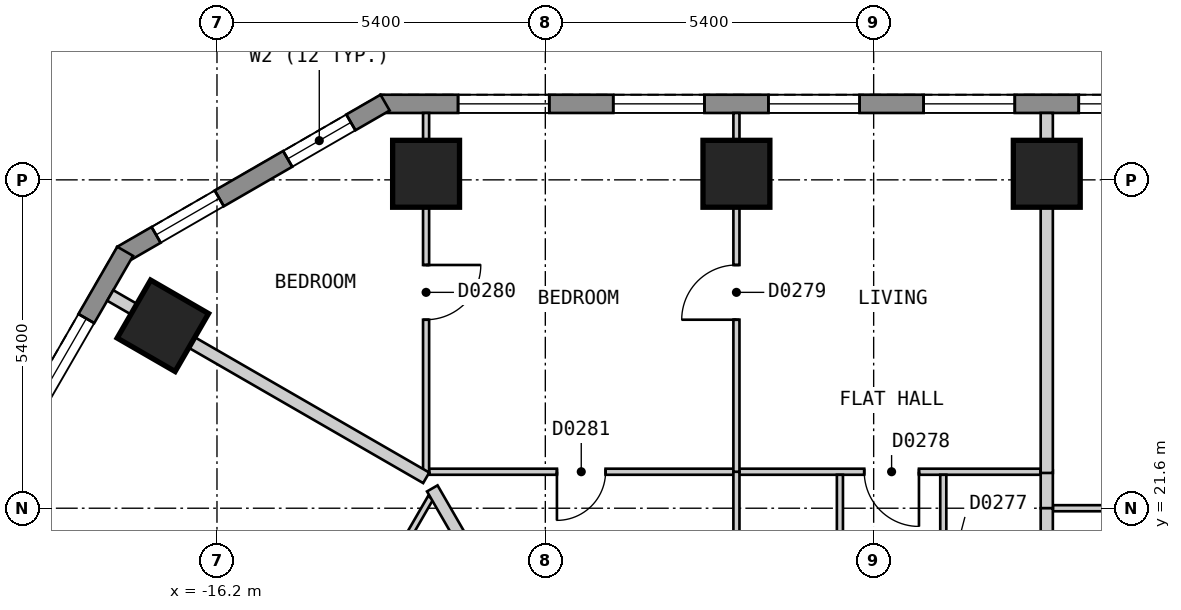
"""IFC4 building model, lengths in metres.
Left out: names, types, materials, properties, quantities, classifications, styles, units other than length and angle.
Written with IfcOpenShell. Run it as: python <this file> out.ifc"""

import sys

from ifc_helpers import new_model, si_unit, direction, frame, frame_2d, origin, origin_2d, place, context, subcontext, project, spatial, polyline, rectangle, outline, extrude, element, fill, save


model = new_model("IFC4")
c1 = context("Model", 3, precision=1e-05, world=origin(), true_north=direction((0.0, 1.0)))
c2 = subcontext(c1, "Body", "Model", "MODEL_VIEW")
j1 = project(units=[si_unit("LENGTHUNIT", "METRE"), si_unit("PLANEANGLEUNIT", "RADIAN")], contexts=[c1])
p1 = place(None, origin())
s1 = spatial("IfcSite", under=j1, at=p1, CompositionType="ELEMENT")
p2 = place(p1, origin())
s2 = spatial("IfcBuilding", under=s1, at=p2, CompositionType="ELEMENT")
p3 = place(p2, frame((0.0, 0.0, 47.4)))
s3 = spatial("IfcBuildingStorey", under=s2, at=p3, CompositionType="ELEMENT", Elevation=47.4)
for number, where, z_axis, x_axis in (
    (1, (-2.553, 27.1, 0.0), (0.0, 0.0, 1.0), (-1.0, 0.0, 0.0)),
    (2, (-7.657, 27.1, 0.0), (0.0, 0.0, 1.0), (-1.0, 0.0, 0.0)),
    (3, (-12.761, 27.1, 0.0), (0.0, 0.0, 1.0), (-1.0, 0.0, 0.0)),
    (4, (-17.09, 24.6, 0.0), (0.0, 0.0, 1.0), (-0.5, -0.866, 0.0)),
):
    element("IfcColumn", number, at=place(p3, frame(where, z_axis=z_axis, x_axis=x_axis)), inside=s3, PredefinedType="COLUMN", context=c2, shape_type="SweptSolid", body=[
        extrude(rectangle(XDim=1.1, YDim=1.1, at=origin_2d()), origin(), (0.0, 0.0, 1.0), 3.0),
    ])
p4 = place(p3, frame((13.51, 28.25, 0.0), z_axis=(0.0, 0.0, 1.0), x_axis=(-1.0, 0.0, 0.0)))
e5 = element("IfcWall", 5, at=p4, inside=s3, PredefinedType="SOLIDWALL", context=c2, shape_type="SweptSolid", body=[
    extrude(outline(polyline([(0.0, -0.15), (27.02, -0.15), (26.94, 0.15), (0.08, 0.15), (0.0, -0.15)])), origin(), (0.0, 0.0, 1.0), 2.7),
])
p5 = place(p4, frame((1.277, 0.0, 0.15)))
e6 = element("IfcOpeningElement", 6, at=p5, cuts=e5, PredefinedType="OPENING", context=c2, shape_type="SweptSolid", body=[
    extrude(rectangle(XDim=1.5, YDim=2.1, at=frame_2d((0.75, 1.05))), frame((0.0, 0.16, 0.0), z_axis=(0.0, -1.0, 0.0), x_axis=(1.0, 0.0, 0.0)), (0.0, 0.0, 1.0), 0.32),
])
p6 = place(p4, frame((3.829, 0.0, 0.15)))
e7 = element("IfcOpeningElement", 7, at=p6, cuts=e5, PredefinedType="OPENING", context=c2, shape_type="SweptSolid", body=[
    extrude(rectangle(XDim=1.5, YDim=2.1, at=frame_2d((0.75, 1.05))), frame((0.0, 0.16, 0.0), z_axis=(0.0, -1.0, 0.0), x_axis=(1.0, 0.0, 0.0)), (0.0, 0.0, 1.0), 0.32),
])
p7 = place(p4, frame((6.381, 0.0, 0.15)))
e8 = element("IfcOpeningElement", 8, at=p7, cuts=e5, PredefinedType="OPENING", context=c2, shape_type="SweptSolid", body=[
    extrude(rectangle(XDim=1.5, YDim=2.1, at=frame_2d((0.75, 1.05))), frame((0.0, 0.16, 0.0), z_axis=(0.0, -1.0, 0.0), x_axis=(1.0, 0.0, 0.0)), (0.0, 0.0, 1.0), 0.32),
])
p8 = place(p4, frame((8.933, 0.0, 0.15)))
e9 = element("IfcOpeningElement", 9, at=p8, cuts=e5, PredefinedType="OPENING", context=c2, shape_type="SweptSolid", body=[
    extrude(rectangle(XDim=1.5, YDim=2.1, at=frame_2d((0.75, 1.05))), frame((0.0, 0.16, 0.0), z_axis=(0.0, -1.0, 0.0), x_axis=(1.0, 0.0, 0.0)), (0.0, 0.0, 1.0), 0.32),
])
p9 = place(p4, frame((11.485, 0.0, 0.15)))
e10 = element("IfcOpeningElement", 10, at=p9, cuts=e5, PredefinedType="OPENING", context=c2, shape_type="SweptSolid", body=[
    extrude(rectangle(XDim=1.5, YDim=2.1, at=frame_2d((0.75, 1.05))), frame((0.0, 0.16, 0.0), z_axis=(0.0, -1.0, 0.0), x_axis=(1.0, 0.0, 0.0)), (0.0, 0.0, 1.0), 0.32),
])
p10 = place(p4, frame((14.037, 0.0, 0.15)))
e11 = element("IfcOpeningElement", 11, at=p10, cuts=e5, PredefinedType="OPENING", context=c2, shape_type="SweptSolid", body=[
    extrude(rectangle(XDim=1.5, YDim=2.1, at=frame_2d((0.75, 1.05))), frame((0.0, 0.16, 0.0), z_axis=(0.0, -1.0, 0.0), x_axis=(1.0, 0.0, 0.0)), (0.0, 0.0, 1.0), 0.32),
])
p11 = place(p4, frame((16.589, 0.0, 0.15)))
e12 = element("IfcOpeningElement", 12, at=p11, cuts=e5, PredefinedType="OPENING", context=c2, shape_type="SweptSolid", body=[
    extrude(rectangle(XDim=1.5, YDim=2.1, at=frame_2d((0.75, 1.05))), frame((0.0, 0.16, 0.0), z_axis=(0.0, -1.0, 0.0), x_axis=(1.0, 0.0, 0.0)), (0.0, 0.0, 1.0), 0.32),
])
p12 = place(p4, frame((19.141, 0.0, 0.15)))
e13 = element("IfcOpeningElement", 13, at=p12, cuts=e5, PredefinedType="OPENING", context=c2, shape_type="SweptSolid", body=[
    extrude(rectangle(XDim=1.5, YDim=2.1, at=frame_2d((0.75, 1.05))), frame((0.0, 0.16, 0.0), z_axis=(0.0, -1.0, 0.0), x_axis=(1.0, 0.0, 0.0)), (0.0, 0.0, 1.0), 0.32),
])
p13 = place(p4, frame((21.693, 0.0, 0.15)))
e14 = element("IfcOpeningElement", 14, at=p13, cuts=e5, PredefinedType="OPENING", context=c2, shape_type="SweptSolid", body=[
    extrude(rectangle(XDim=1.5, YDim=2.1, at=frame_2d((0.75, 1.05))), frame((0.0, 0.16, 0.0), z_axis=(0.0, -1.0, 0.0), x_axis=(1.0, 0.0, 0.0)), (0.0, 0.0, 1.0), 0.32),
])
p14 = place(p4, frame((24.245, 0.0, 0.15)))
e15 = element("IfcOpeningElement", 15, at=p14, cuts=e5, PredefinedType="OPENING", context=c2, shape_type="SweptSolid", body=[
    extrude(rectangle(XDim=1.5, YDim=2.1, at=frame_2d((0.75, 1.05))), frame((0.0, 0.16, 0.0), z_axis=(0.0, -1.0, 0.0), x_axis=(1.0, 0.0, 0.0)), (0.0, 0.0, 1.0), 0.32),
])
p15 = place(p3, frame((-13.435, 28.27, 0.0), z_axis=(0.0, 0.0, 1.0), x_axis=(-0.866010750942, -0.50002537861, 0.0)))
e16 = element("IfcWall", 16, at=p15, inside=s3, PredefinedType="SOLIDWALL", context=c2, shape_type="SweptSolid", body=[
    extrude(outline(polyline([(0.0, -0.15), (5.0, -0.15), (4.919, 0.15), (0.08, 0.15), (0.0, -0.15)])), origin(), (0.0, 0.0, 1.0), 2.7),
])
p16 = place(p15, frame((0.65, 0.0, 0.15)))
e17 = element("IfcOpeningElement", 17, at=p16, cuts=e16, PredefinedType="OPENING", context=c2, shape_type="SweptSolid", body=[
    extrude(rectangle(XDim=1.2, YDim=2.1, at=frame_2d((0.6, 1.05))), frame((0.0, 0.16, 0.0), z_axis=(0.0, -1.0, 0.0), x_axis=(1.0, 0.0, 0.0)), (0.0, 0.0, 1.0), 0.32),
])
p17 = place(p15, frame((3.149, 0.0, 0.15)))
e18 = element("IfcOpeningElement", 18, at=p17, cuts=e16, PredefinedType="OPENING", context=c2, shape_type="SweptSolid", body=[
    extrude(rectangle(XDim=1.2, YDim=2.1, at=frame_2d((0.6, 1.05))), frame((0.0, 0.16, 0.0), z_axis=(0.0, -1.0, 0.0), x_axis=(1.0, 0.0, 0.0)), (0.0, 0.0, 1.0), 0.32),
])
p18 = place(p3, frame((-17.71, 25.825, 0.0), z_axis=(0.0, 0.0, 1.0), x_axis=(-0.500001938803, -0.866024284413, 0.0)))
e19 = element("IfcWall", 19, at=p18, inside=s3, PredefinedType="SOLIDWALL", context=c2, shape_type="SweptSolid", body=[
    extrude(outline(polyline([(0.0, -0.15), (27.02, -0.15), (26.94, 0.15), (0.08, 0.15), (0.0, -0.15)])), origin(), (0.0, 0.0, 1.0), 2.7),
])
p19 = place(p18, frame((1.277, 0.0, 0.15)))
e20 = element("IfcOpeningElement", 20, at=p19, cuts=e19, PredefinedType="OPENING", context=c2, shape_type="SweptSolid", body=[
    extrude(rectangle(XDim=1.5, YDim=2.1, at=frame_2d((0.75, 1.05))), frame((0.0, 0.16, 0.0), z_axis=(0.0, -1.0, 0.0), x_axis=(1.0, 0.0, 0.0)), (0.0, 0.0, 1.0), 0.32),
])
p20 = place(p18, frame((3.829, 0.0, 0.15)))
e21 = element("IfcOpeningElement", 21, at=p20, cuts=e19, PredefinedType="OPENING", context=c2, shape_type="SweptSolid", body=[
    extrude(rectangle(XDim=1.5, YDim=2.1, at=frame_2d((0.75, 1.05))), frame((0.0, 0.16, 0.0), z_axis=(0.0, -1.0, 0.0), x_axis=(1.0, 0.0, 0.0)), (0.0, 0.0, 1.0), 0.32),
])
p21 = place(p18, frame((6.382, 0.0, 0.15)))
e22 = element("IfcOpeningElement", 22, at=p21, cuts=e19, PredefinedType="OPENING", context=c2, shape_type="SweptSolid", body=[
    extrude(rectangle(XDim=1.5, YDim=2.1, at=frame_2d((0.75, 1.05))), frame((0.0, 0.16, 0.0), z_axis=(0.0, -1.0, 0.0), x_axis=(1.0, 0.0, 0.0)), (0.0, 0.0, 1.0), 0.32),
])
p22 = place(p18, frame((8.933, 0.0, 0.15)))
e23 = element("IfcOpeningElement", 23, at=p22, cuts=e19, PredefinedType="OPENING", context=c2, shape_type="SweptSolid", body=[
    extrude(rectangle(XDim=1.5, YDim=2.1, at=frame_2d((0.75, 1.05))), frame((0.0, 0.16, 0.0), z_axis=(0.0, -1.0, 0.0), x_axis=(1.0, 0.0, 0.0)), (0.0, 0.0, 1.0), 0.32),
])
p23 = place(p18, frame((11.485, 0.0, 0.15)))
e24 = element("IfcOpeningElement", 24, at=p23, cuts=e19, PredefinedType="OPENING", context=c2, shape_type="SweptSolid", body=[
    extrude(rectangle(XDim=1.5, YDim=2.1, at=frame_2d((0.75, 1.05))), frame((0.0, 0.16, 0.0), z_axis=(0.0, -1.0, 0.0), x_axis=(1.0, 0.0, 0.0)), (0.0, 0.0, 1.0), 0.32),
])
p24 = place(p18, frame((14.037, 0.0, 0.15)))
e25 = element("IfcOpeningElement", 25, at=p24, cuts=e19, PredefinedType="OPENING", context=c2, shape_type="SweptSolid", body=[
    extrude(rectangle(XDim=1.5, YDim=2.1, at=frame_2d((0.75, 1.05))), frame((0.0, 0.16, 0.0), z_axis=(0.0, -1.0, 0.0), x_axis=(1.0, 0.0, 0.0)), (0.0, 0.0, 1.0), 0.32),
])
p25 = place(p18, frame((16.589, 0.0, 0.15)))
e26 = element("IfcOpeningElement", 26, at=p25, cuts=e19, PredefinedType="OPENING", context=c2, shape_type="SweptSolid", body=[
    extrude(rectangle(XDim=1.5, YDim=2.1, at=frame_2d((0.75, 1.05))), frame((0.0, 0.16, 0.0), z_axis=(0.0, -1.0, 0.0), x_axis=(1.0, 0.0, 0.0)), (0.0, 0.0, 1.0), 0.32),
])
p26 = place(p18, frame((19.141, 0.0, 0.15)))
e27 = element("IfcOpeningElement", 27, at=p26, cuts=e19, PredefinedType="OPENING", context=c2, shape_type="SweptSolid", body=[
    extrude(rectangle(XDim=1.5, YDim=2.1, at=frame_2d((0.75, 1.05))), frame((0.0, 0.16, 0.0), z_axis=(0.0, -1.0, 0.0), x_axis=(1.0, 0.0, 0.0)), (0.0, 0.0, 1.0), 0.32),
])
p27 = place(p18, frame((21.693, 0.0, 0.15)))
e28 = element("IfcOpeningElement", 28, at=p27, cuts=e19, PredefinedType="OPENING", context=c2, shape_type="SweptSolid", body=[
    extrude(rectangle(XDim=1.5, YDim=2.1, at=frame_2d((0.75, 1.05))), frame((0.0, 0.16, 0.0), z_axis=(0.0, -1.0, 0.0), x_axis=(1.0, 0.0, 0.0)), (0.0, 0.0, 1.0), 0.32),
])
p28 = place(p18, frame((24.244, 0.0, 0.15)))
e29 = element("IfcOpeningElement", 29, at=p28, cuts=e19, PredefinedType="OPENING", context=c2, shape_type="SweptSolid", body=[
    extrude(rectangle(XDim=1.5, YDim=2.1, at=frame_2d((0.75, 1.05))), frame((0.0, 0.16, 0.0), z_axis=(0.0, -1.0, 0.0), x_axis=(1.0, 0.0, 0.0)), (0.0, 0.0, 1.0), 0.32),
])
p29 = place(p3, frame((-2.453, 21.6, 0.0), z_axis=(0.0, 0.0, 1.0), x_axis=(1.0, 0.0, 0.0)))
e30 = element("IfcWall", 30, at=p29, inside=s3, PredefinedType="PARTITIONING", context=c2, shape_type="SweptSolid", body=[
    extrude(rectangle(XDim=4.954, YDim=0.1, at=frame_2d((2.477, 0.0))), origin(), (0.0, 0.0, 1.0), 2.7),
])
p30 = place(p29, frame((2.052, 0.0, 0.0)))
e31 = element("IfcOpeningElement", 31, at=p30, cuts=e30, PredefinedType="OPENING", context=c2, shape_type="SweptSolid", body=[
    extrude(rectangle(XDim=0.8, YDim=2.1, at=frame_2d((0.4, 1.05))), frame((0.0, 0.06, 0.0), z_axis=(0.0, -1.0, 0.0), x_axis=(1.0, 0.0, 0.0)), (0.0, 0.0, 1.0), 0.12),
])
p31 = place(p3, frame((-12.711, 22.2, 0.0), z_axis=(0.0, 0.0, 1.0), x_axis=(1.0, 0.0, 0.0)))
e32 = element("IfcWall", 32, at=p31, inside=s3, PredefinedType="PARTITIONING", context=c2, shape_type="SweptSolid", body=[
    extrude(rectangle(XDim=10.058, YDim=0.1, at=frame_2d((5.029, 0.0))), origin(), (0.0, 0.0, 1.0), 2.7),
])
p32 = place(p31, frame((7.156, 0.0, 0.0)))
e33 = element("IfcOpeningElement", 33, at=p32, cuts=e32, PredefinedType="OPENING", context=c2, shape_type="SweptSolid", body=[
    extrude(rectangle(XDim=0.9, YDim=2.1, at=frame_2d((0.45, 1.05))), frame((0.0, 0.06, 0.0), z_axis=(0.0, -1.0, 0.0), x_axis=(1.0, 0.0, 0.0)), (0.0, 0.0, 1.0), 0.12),
])
p33 = place(p31, frame((2.102, 0.0, 0.0)))
e34 = element("IfcOpeningElement", 34, at=p33, cuts=e32, PredefinedType="OPENING", context=c2, shape_type="SweptSolid", body=[
    extrude(rectangle(XDim=0.8, YDim=2.1, at=frame_2d((0.4, 1.05))), frame((0.0, 0.06, 0.0), z_axis=(0.0, -1.0, 0.0), x_axis=(1.0, 0.0, 0.0)), (0.0, 0.0, 1.0), 0.12),
])
p34 = place(p3, frame((-20.169, 8.812, 0.0), z_axis=(0.0, 0.0, 1.0), x_axis=(0.499995459772, 0.86602802507, 0.0)))
e35 = element("IfcWall", 35, at=p34, inside=s3, PredefinedType="PARTITIONING", context=c2, shape_type="SweptSolid", body=[
    extrude(rectangle(XDim=14.966, YDim=0.1, at=frame_2d((7.483, 0.0))), origin(), (0.0, 0.0, 1.0), 2.7),
])
p35 = place(p34, frame((7.105, 0.0, 0.0)))
e36 = element("IfcOpeningElement", 36, at=p35, cuts=e35, PredefinedType="OPENING", context=c2, shape_type="SweptSolid", body=[
    extrude(rectangle(XDim=0.9, YDim=2.1, at=frame_2d((0.45, 1.05))), frame((0.0, 0.06, 0.0), z_axis=(0.0, -1.0, 0.0), x_axis=(1.0, 0.0, 0.0)), (0.0, 0.0, 1.0), 0.12),
])
p36 = place(p3, frame((-4.255, 18.1, 0.0), z_axis=(0.0, 0.0, 1.0), x_axis=(0.0, 1.0, 0.0)))
e37 = element("IfcWall", 37, at=p36, inside=s3, PredefinedType="PARTITIONING", context=c2, shape_type="SweptSolid", body=[
    extrude(rectangle(XDim=4.05, YDim=0.1, at=frame_2d((2.025, 0.0))), origin(), (0.0, 0.0, 1.0), 2.7),
])
p37 = place(p36, frame((1.55, 0.0, 0.0)))
e38 = element("IfcOpeningElement", 38, at=p37, cuts=e37, PredefinedType="OPENING", context=c2, shape_type="SweptSolid", body=[
    extrude(rectangle(XDim=0.9, YDim=2.1, at=frame_2d((0.45, 1.05))), frame((0.0, 0.06, 0.0), z_axis=(0.0, -1.0, 0.0), x_axis=(1.0, 0.0, 0.0)), (0.0, 0.0, 1.0), 0.12),
])
p38 = place(p3, frame((-5.955, 18.1, 0.0), z_axis=(0.0, 0.0, 1.0), x_axis=(0.0, 1.0, 0.0)))
e39 = element("IfcWall", 39, at=p38, inside=s3, PredefinedType="PARTITIONING", context=c2, shape_type="SweptSolid", body=[
    extrude(rectangle(XDim=4.05, YDim=0.1, at=frame_2d((2.025, 0.0))), origin(), (0.0, 0.0, 1.0), 2.7),
])
p39 = place(p38, frame((1.6, 0.0, 0.0)))
e40 = element("IfcOpeningElement", 40, at=p39, cuts=e39, PredefinedType="OPENING", context=c2, shape_type="SweptSolid", body=[
    extrude(rectangle(XDim=0.8, YDim=2.1, at=frame_2d((0.4, 1.05))), frame((0.0, 0.06, 0.0), z_axis=(0.0, -1.0, 0.0), x_axis=(1.0, 0.0, 0.0)), (0.0, 0.0, 1.0), 0.12),
])
p40 = place(p3, frame((-7.657, 18.1, 0.0), z_axis=(0.0, 0.0, 1.0), x_axis=(0.0, 1.0, 0.0)))
e41 = element("IfcWall", 41, at=p40, inside=s3, PredefinedType="PARTITIONING", context=c2, shape_type="SweptSolid", body=[
    extrude(rectangle(XDim=4.1, YDim=0.1, at=frame_2d((2.05, 0.0))), origin(), (0.0, 0.0, 1.0), 2.7),
])
p41 = place(p3, frame((-12.761, 22.2, 0.0), z_axis=(0.0, 0.0, 1.0), x_axis=(0.0, 1.0, 0.0)))
e42 = element("IfcWall", 42, at=p41, inside=s3, PredefinedType="PARTITIONING", context=c2, shape_type="SweptSolid", body=[
    extrude(rectangle(XDim=5.9, YDim=0.1, at=frame_2d((2.95, 0.0))), origin(), (0.0, 0.0, 1.0), 2.7),
])
p42 = place(p41, frame((2.5, 0.0, 0.0)))
e43 = element("IfcOpeningElement", 43, at=p42, cuts=e42, PredefinedType="OPENING", context=c2, shape_type="SweptSolid", body=[
    extrude(rectangle(XDim=0.9, YDim=2.1, at=frame_2d((0.45, 1.05))), frame((0.0, 0.06, 0.0), z_axis=(0.0, -1.0, 0.0), x_axis=(1.0, 0.0, 0.0)), (0.0, 0.0, 1.0), 0.12),
])
p43 = place(p3, frame((-12.659, 21.926, 0.0), z_axis=(0.0, 0.0, 1.0), x_axis=(0.500025458316, -0.86601070492, 0.0)))
e44 = element("IfcWall", 44, at=p43, inside=s3, PredefinedType="PARTITIONING", context=c2, shape_type="SweptSolid", body=[
    extrude(rectangle(XDim=4.533, YDim=0.2, at=frame_2d((2.267, 0.0))), origin(), (0.0, 0.0, 1.0), 2.7),
])
p44 = place(p3, frame((-2.553, 22.22, 0.0), z_axis=(0.0, 0.0, 1.0), x_axis=(0.0, -1.0, 0.0)))
e45 = element("IfcWall", 45, at=p44, inside=s3, PredefinedType="PARTITIONING", context=c2, shape_type="SweptSolid", body=[
    extrude(rectangle(XDim=0.62, YDim=0.2, at=frame_2d((0.31, 0.0))), origin(), (0.0, 0.0, 1.0), 2.7),
])
p45 = place(p3, frame((-17.955, 25.099, 0.0), z_axis=(0.0, 0.0, 1.0), x_axis=(0.86609140076, -0.499885672459, 0.0)))
e46 = element("IfcWall", 46, at=p45, inside=s3, PredefinedType="PARTITIONING", context=c2, shape_type="SweptSolid", body=[
    extrude(rectangle(XDim=6.0, YDim=0.2, at=frame_2d((3.0, 0.0))), origin(), (0.0, 0.0, 1.0), 2.7),
])
p46 = place(p3, frame((-2.553, 18.1, 0.0), z_axis=(0.0, 0.0, 1.0), x_axis=(0.0, 1.0, 0.0)))
e47 = element("IfcWall", 47, at=p46, inside=s3, PredefinedType="PARTITIONING", context=c2, shape_type="SweptSolid", body=[
    extrude(rectangle(XDim=3.5, YDim=0.2, at=frame_2d((1.75, 0.0))), origin(), (0.0, 0.0, 1.0), 2.7),
])
p47 = place(p3, frame((-2.553, 22.18, 0.0), z_axis=(0.0, 0.0, 1.0), x_axis=(0.0, 1.0, 0.0)))
e48 = element("IfcWall", 48, at=p47, inside=s3, PredefinedType="PARTITIONING", context=c2, shape_type="SweptSolid", body=[
    extrude(rectangle(XDim=5.92, YDim=0.2, at=frame_2d((2.96, 0.0))), origin(), (0.0, 0.0, 1.0), 2.7),
])
p48 = place(p3, frame((-7.657, 22.2, 0.0), z_axis=(0.0, 0.0, 1.0), x_axis=(0.0, 1.0, 0.0)))
e49 = element("IfcWall", 49, at=p48, inside=s3, PredefinedType="PARTITIONING", context=c2, shape_type="SweptSolid", body=[
    extrude(rectangle(XDim=5.9, YDim=0.1, at=frame_2d((2.95, 0.0))), origin(), (0.0, 0.0, 1.0), 2.7),
])
p49 = place(p48, frame((2.5, 0.0, 0.0)))
e50 = element("IfcOpeningElement", 50, at=p49, cuts=e49, PredefinedType="OPENING", context=c2, shape_type="SweptSolid", body=[
    extrude(rectangle(XDim=0.9, YDim=2.1, at=frame_2d((0.45, 1.05))), frame((0.0, 0.06, 0.0), z_axis=(0.0, -1.0, 0.0), x_axis=(1.0, 0.0, 0.0)), (0.0, 0.0, 1.0), 0.12),
])
p50 = place(p10, origin())
e51 = element("IfcWindow", 51, at=p50, inside=s3, PartitioningType="SINGLE_PANEL", PredefinedType="WINDOW", context=c2, shape_type="SweptSolid", body=[
    extrude(rectangle(XDim=1.5, YDim=2.1, at=frame_2d((0.75, 1.05))), frame((0.0, 0.03, 0.0), z_axis=(0.0, -1.0, 0.0), x_axis=(1.0, 0.0, 0.0)), (0.0, 0.0, 1.0), 0.06),
])
fill(e11, e51)
p51 = place(p11, origin())
e52 = element("IfcWindow", 52, at=p51, inside=s3, PartitioningType="SINGLE_PANEL", PredefinedType="WINDOW", context=c2, shape_type="SweptSolid", body=[
    extrude(rectangle(XDim=1.5, YDim=2.1, at=frame_2d((0.75, 1.05))), frame((0.0, 0.03, 0.0), z_axis=(0.0, -1.0, 0.0), x_axis=(1.0, 0.0, 0.0)), (0.0, 0.0, 1.0), 0.06),
])
fill(e12, e52)
p52 = place(p12, origin())
e53 = element("IfcWindow", 53, at=p52, inside=s3, PartitioningType="SINGLE_PANEL", PredefinedType="WINDOW", context=c2, shape_type="SweptSolid", body=[
    extrude(rectangle(XDim=1.5, YDim=2.1, at=frame_2d((0.75, 1.05))), frame((0.0, 0.03, 0.0), z_axis=(0.0, -1.0, 0.0), x_axis=(1.0, 0.0, 0.0)), (0.0, 0.0, 1.0), 0.06),
])
fill(e13, e53)
p53 = place(p13, origin())
e54 = element("IfcWindow", 54, at=p53, inside=s3, PartitioningType="SINGLE_PANEL", PredefinedType="WINDOW", context=c2, shape_type="SweptSolid", body=[
    extrude(rectangle(XDim=1.5, YDim=2.1, at=frame_2d((0.75, 1.05))), frame((0.0, 0.03, 0.0), z_axis=(0.0, -1.0, 0.0), x_axis=(1.0, 0.0, 0.0)), (0.0, 0.0, 1.0), 0.06),
])
fill(e14, e54)
p54 = place(p14, origin())
e55 = element("IfcWindow", 55, at=p54, inside=s3, PartitioningType="SINGLE_PANEL", PredefinedType="WINDOW", context=c2, shape_type="SweptSolid", body=[
    extrude(rectangle(XDim=1.5, YDim=2.1, at=frame_2d((0.75, 1.05))), frame((0.0, 0.03, 0.0), z_axis=(0.0, -1.0, 0.0), x_axis=(1.0, 0.0, 0.0)), (0.0, 0.0, 1.0), 0.06),
])
fill(e15, e55)
p55 = place(p16, origin())
e56 = element("IfcWindow", 56, at=p55, inside=s3, PartitioningType="SINGLE_PANEL", PredefinedType="WINDOW", context=c2, shape_type="SweptSolid", body=[
    extrude(rectangle(XDim=1.2, YDim=2.1, at=frame_2d((0.6, 1.05))), frame((0.0, 0.03, 0.0), z_axis=(0.0, -1.0, 0.0), x_axis=(1.0, 0.0, 0.0)), (0.0, 0.0, 1.0), 0.06),
])
fill(e17, e56)
p56 = place(p17, origin())
e57 = element("IfcWindow", 57, at=p56, inside=s3, PartitioningType="SINGLE_PANEL", PredefinedType="WINDOW", context=c2, shape_type="SweptSolid", body=[
    extrude(rectangle(XDim=1.2, YDim=2.1, at=frame_2d((0.6, 1.05))), frame((0.0, 0.03, 0.0), z_axis=(0.0, -1.0, 0.0), x_axis=(1.0, 0.0, 0.0)), (0.0, 0.0, 1.0), 0.06),
])
fill(e18, e57)
p57 = place(p19, origin())
e58 = element("IfcWindow", 58, at=p57, inside=s3, PartitioningType="SINGLE_PANEL", PredefinedType="WINDOW", context=c2, shape_type="SweptSolid", body=[
    extrude(rectangle(XDim=1.5, YDim=2.1, at=frame_2d((0.75, 1.05))), frame((0.0, 0.03, 0.0), z_axis=(0.0, -1.0, 0.0), x_axis=(1.0, 0.0, 0.0)), (0.0, 0.0, 1.0), 0.06),
])
fill(e20, e58)
p58 = place(p32, origin())
e59 = element("IfcDoor", 59, at=p58, inside=s3, OperationType="SINGLE_SWING_RIGHT", PredefinedType="DOOR", context=c2, shape_type="SweptSolid", body=[
    extrude(rectangle(XDim=0.9, YDim=2.1, at=frame_2d((0.45, 1.05))), frame((0.0, 0.025, 0.0), z_axis=(0.0, -1.0, 0.0), x_axis=(1.0, 0.0, 0.0)), (0.0, 0.0, 1.0), 0.05),
])
fill(e33, e59)
p59 = place(p49, origin())
e60 = element("IfcDoor", 60, at=p59, inside=s3, OperationType="SINGLE_SWING_LEFT", PredefinedType="DOOR", context=c2, shape_type="SweptSolid", body=[
    extrude(rectangle(XDim=0.9, YDim=2.1, at=frame_2d((0.45, 1.05))), frame((0.0, 0.025, 0.0), z_axis=(0.0, -1.0, 0.0), x_axis=(1.0, 0.0, 0.0)), (0.0, 0.0, 1.0), 0.05),
])
fill(e50, e60)
p60 = place(p42, origin())
e61 = element("IfcDoor", 61, at=p60, inside=s3, OperationType="SINGLE_SWING_RIGHT", PredefinedType="DOOR", context=c2, shape_type="SweptSolid", body=[
    extrude(rectangle(XDim=0.9, YDim=2.1, at=frame_2d((0.45, 1.05))), frame((0.0, 0.025, 0.0), z_axis=(0.0, -1.0, 0.0), x_axis=(1.0, 0.0, 0.0)), (0.0, 0.0, 1.0), 0.05),
])
fill(e43, e61)
p61 = place(p33, origin())
e62 = element("IfcDoor", 62, at=p61, inside=s3, OperationType="SINGLE_SWING_LEFT", PredefinedType="DOOR", context=c2, shape_type="SweptSolid", body=[
    extrude(rectangle(XDim=0.8, YDim=2.1, at=frame_2d((0.4, 1.05))), frame((0.0, 0.025, 0.0), z_axis=(0.0, -1.0, 0.0), x_axis=(1.0, 0.0, 0.0)), (0.0, 0.0, 1.0), 0.05),
])
fill(e34, e62)
save(model, sys.argv[1])
